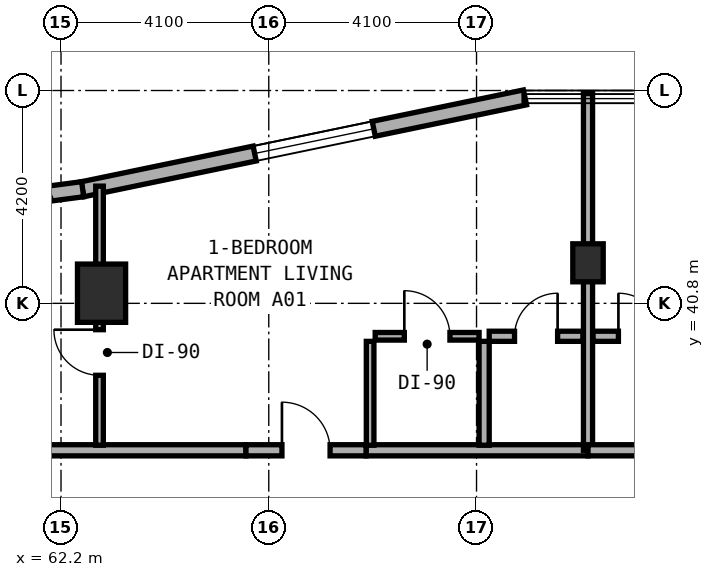
"""IFC4 building model, lengths in metres.
Left out: names, types, materials, properties, quantities, classifications, styles, units other than length and angle.
Written with IfcOpenShell. Run it as: python <this file> out.ifc"""

import sys

from ifc_helpers import new_model, si_unit, direction, frame, frame_2d, origin, origin_2d, place, context, subcontext, project, spatial, rectangle, extrude, element, fill, save


model = new_model("IFC4")
c1 = context("Model", 3, precision=1e-05, world=origin(), true_north=direction((0.0, 1.0)))
c2 = subcontext(c1, "Body", "Model", "MODEL_VIEW")
j1 = project(units=[si_unit("LENGTHUNIT", "METRE"), si_unit("PLANEANGLEUNIT", "RADIAN")], contexts=[c1])
p1 = place(None, origin())
s1 = spatial("IfcSite", under=j1, at=p1, CompositionType="ELEMENT")
p2 = place(p1, origin())
s2 = spatial("IfcBuilding", under=s1, at=p2, CompositionType="ELEMENT")
p3 = place(p2, frame((0.0, 0.0, 73.0)))
s3 = spatial("IfcBuildingStorey", under=s2, at=p3, CompositionType="ELEMENT", Elevation=73.0)
p4 = place(p3, frame((72.6, 41.6, 0.0), z_axis=(0.0, 0.0, 1.0), x_axis=(1.0, 0.0, 0.0)))
e1 = element("IfcColumn", 1, at=p4, inside=s3, PredefinedType="COLUMN", context=c2, shape_type="SweptSolid", body=[
    extrude(rectangle(XDim=0.6, YDim=0.75, at=origin_2d()), origin(), (0.0, 0.0, 1.0), 3.5),
])
p5 = place(p3, frame((63.0, 41.0, 0.0), z_axis=(0.0, 0.0, 1.0), x_axis=(1.0, 0.0, 0.0)))
e2 = element("IfcColumn", 2, at=p5, inside=s3, PredefinedType="COLUMN", context=c2, shape_type="SweptSolid", body=[
    extrude(rectangle(XDim=0.95, YDim=1.15, at=origin_2d()), origin(), (0.0, 0.0, 1.0), 3.5),
])
p6 = place(p3, frame((71.356, 44.864, 0.0), z_axis=(0.0, 0.0, 1.0), x_axis=(-0.979127260729, -0.203248142175, 0.0)))
e3 = element("IfcWall", 3, at=p6, inside=s3, PredefinedType="STANDARD", context=c2, shape_type="SweptSolid", body=[
    extrude(rectangle(XDim=8.92, YDim=0.3, at=frame_2d((4.46, 0.0))), origin(), (0.0, 0.0, 1.0), 3.25),
])
p7 = place(p6, frame((3.048, 0.0, 0.8)))
e4 = element("IfcOpeningElement", 4, at=p7, cuts=e3, PredefinedType="OPENING", context=c2, shape_type="SweptSolid", body=[
    extrude(rectangle(XDim=2.4, YDim=1.6, at=frame_2d((1.2, 0.8))), frame((0.0, 0.16, 0.0), z_axis=(0.0, -1.0, 0.0), x_axis=(1.0, 0.0, 0.0)), (0.0, 0.0, 1.0), 0.32),
])
p8 = place(p3, frame((62.627, 43.052, 0.0), z_axis=(0.0, 0.0, 1.0), x_axis=(-0.991480488834, -0.130255288807, 0.0)))
e5 = element("IfcWall", 5, at=p8, inside=s3, PredefinedType="STANDARD", context=c2, shape_type="SweptSolid", body=[
    extrude(rectangle(XDim=0.729, YDim=0.3, at=frame_2d((0.365, 0.0))), origin(), (0.0, 0.0, 1.0), 3.25),
])
p9 = place(p3, frame((58.16, 37.9, 0.0), z_axis=(0.0, 0.0, 1.0), x_axis=(1.0, 0.0, 0.0)))
e6 = element("IfcWall", 6, at=p9, inside=s3, PredefinedType="SOLIDWALL", context=c2, shape_type="SweptSolid", body=[
    extrude(rectangle(XDim=7.69, YDim=0.22, at=frame_2d((3.845, 0.0))), origin(), (0.0, 0.0, 1.0), 2.865),
])
p10 = place(p3, frame((68.22, 37.9, 0.0), z_axis=(0.0, 0.0, 1.0), x_axis=(1.0, 0.0, 0.0)))
e7 = element("IfcWall", 7, at=p10, inside=s3, PredefinedType="SOLIDWALL", context=c2, shape_type="SweptSolid", body=[
    extrude(rectangle(XDim=4.38, YDim=0.22, at=frame_2d((2.19, 0.0))), origin(), (0.0, 0.0, 1.0), 2.725),
])
p11 = place(p3, frame((65.85, 37.9, 0.0), z_axis=(0.0, 0.0, 1.0), x_axis=(1.0, 0.0, 0.0)))
e8 = element("IfcWall", 8, at=p11, inside=s3, PredefinedType="SOLIDWALL", context=c2, shape_type="SweptSolid", body=[
    extrude(rectangle(XDim=2.37, YDim=0.22, at=frame_2d((1.185, 0.0))), origin(), (0.0, 0.0, 1.0), 3.22),
])
p12 = place(p11, frame((0.71, 0.0, 0.0)))
e9 = element("IfcOpeningElement", 9, at=p12, cuts=e8, PredefinedType="OPENING", context=c2, shape_type="SweptSolid", body=[
    extrude(rectangle(XDim=0.95, YDim=2.1, at=frame_2d((0.475, 1.05))), frame((0.0, 0.12, 0.0), z_axis=(0.0, -1.0, 0.0), x_axis=(1.0, 0.0, 0.0)), (0.0, 0.0, 1.0), 0.24),
])
p13 = place(p3, frame((62.96, 38.0, 0.0), z_axis=(0.0, 0.0, 1.0), x_axis=(0.0, 1.0, 0.0)))
e10 = element("IfcWall", 10, at=p13, inside=s3, PredefinedType="PARTITIONING", context=c2, shape_type="SweptSolid", body=[
    extrude(rectangle(XDim=5.113, YDim=0.15, at=frame_2d((2.557, 0.0))), origin(), (0.0, 0.0, 1.0), 2.865),
])
p14 = place(p13, frame((1.38, 0.0, 0.0)))
e11 = element("IfcOpeningElement", 11, at=p14, cuts=e10, PredefinedType="OPENING", context=c2, shape_type="SweptSolid", body=[
    extrude(rectangle(XDim=0.9, YDim=2.1, at=frame_2d((0.45, 1.05))), frame((0.0, 0.085, 0.0), z_axis=(0.0, -1.0, 0.0), x_axis=(1.0, 0.0, 0.0)), (0.0, 0.0, 1.0), 0.17),
])
p15 = place(p3, frame((70.55, 38.0, 0.0), z_axis=(0.0, 0.0, 1.0), x_axis=(0.0, 1.0, 0.0)))
e12 = element("IfcWall", 12, at=p15, inside=s3, PredefinedType="PLUMBINGWALL", context=c2, shape_type="SweptSolid", body=[
    extrude(rectangle(XDim=2.05, YDim=0.2, at=frame_2d((1.025, 0.0))), origin(), (0.0, 0.0, 1.0), 3.22),
])
p16 = place(p3, frame((68.3, 38.0, 0.0), z_axis=(0.0, 0.0, 1.0), x_axis=(0.0, 1.0, 0.0)))
e13 = element("IfcWall", 13, at=p16, inside=s3, PredefinedType="PARTITIONING", context=c2, shape_type="SweptSolid", body=[
    extrude(rectangle(XDim=2.05, YDim=0.15, at=frame_2d((1.025, 0.0))), origin(), (0.0, 0.0, 1.0), 3.22),
])
p17 = place(p3, frame((70.65, 40.15, 0.0), z_axis=(0.0, 0.0, 1.0), x_axis=(1.0, 0.0, 0.0)))
e14 = element("IfcWall", 14, at=p17, inside=s3, PredefinedType="PLUMBINGWALL", context=c2, shape_type="SweptSolid", body=[
    extrude(rectangle(XDim=1.85, YDim=0.2, at=frame_2d((0.925, 0.0))), origin(), (0.0, 0.0, 1.0), 3.22),
])
p18 = place(p17, frame((0.5, 0.0, 0.0)))
e15 = element("IfcOpeningElement", 15, at=p18, cuts=e14, PredefinedType="OPENING", context=c2, shape_type="SweptSolid", body=[
    extrude(rectangle(XDim=0.85, YDim=2.1, at=frame_2d((0.425, 1.05))), frame((0.0, 0.11, 0.0), z_axis=(0.0, -1.0, 0.0), x_axis=(1.0, 0.0, 0.0)), (0.0, 0.0, 1.0), 0.22),
])
p19 = place(p3, frame((68.4, 40.15, 0.0), z_axis=(0.0, 0.0, 1.0), x_axis=(1.0, 0.0, 0.0)))
e16 = element("IfcWall", 16, at=p19, inside=s3, PredefinedType="PARTITIONING", context=c2, shape_type="SweptSolid", body=[
    extrude(rectangle(XDim=2.05, YDim=0.15, at=frame_2d((1.025, 0.0))), origin(), (0.0, 0.0, 1.0), 3.22),
])
p20 = place(p19, frame((0.575, 0.0, 0.0)))
e17 = element("IfcOpeningElement", 17, at=p20, cuts=e16, PredefinedType="OPENING", context=c2, shape_type="SweptSolid", body=[
    extrude(rectangle(XDim=0.9, YDim=2.1, at=frame_2d((0.45, 1.05))), frame((0.0, 0.085, 0.0), z_axis=(0.0, -1.0, 0.0), x_axis=(1.0, 0.0, 0.0)), (0.0, 0.0, 1.0), 0.17),
])
p21 = place(p3, frame((72.6, 37.9, 0.0), z_axis=(0.0, 0.0, 1.0), x_axis=(0.0, 1.0, 0.0)))
e18 = element("IfcWall", 18, at=p21, inside=s3, PredefinedType="SOLIDWALL", context=c2, shape_type="SweptSolid", body=[
    extrude(rectangle(XDim=7.04, YDim=0.18, at=frame_2d((3.52, 0.0))), origin(), (0.0, 0.0, 1.0), 2.725),
])
p22 = place(p3, frame((72.6, 37.9, 0.0), z_axis=(0.0, 0.0, 1.0), x_axis=(1.0, 0.0, 0.0)))
e19 = element("IfcWall", 19, at=p22, inside=s3, PredefinedType="SOLIDWALL", context=c2, shape_type="SweptSolid", body=[
    extrude(rectangle(XDim=4.38, YDim=0.22, at=frame_2d((2.19, 0.0))), origin(), (0.0, 0.0, 1.0), 2.725),
])
p23 = place(p3, frame((72.7, 40.15, 0.0), z_axis=(0.0, 0.0, 1.0), x_axis=(1.0, 0.0, 0.0)))
e20 = element("IfcWall", 20, at=p23, inside=s3, PredefinedType="PLUMBINGWALL", context=c2, shape_type="SweptSolid", body=[
    extrude(rectangle(XDim=1.85, YDim=0.2, at=frame_2d((0.925, 0.0))), origin(), (0.0, 0.0, 1.0), 3.22),
])
p24 = place(p23, frame((0.5, 0.0, 0.0)))
e21 = element("IfcOpeningElement", 21, at=p24, cuts=e20, PredefinedType="OPENING", context=c2, shape_type="SweptSolid", body=[
    extrude(rectangle(XDim=0.85, YDim=2.1, at=frame_2d((0.425, 1.05))), frame((0.0, 0.11, 0.0), z_axis=(0.0, -1.0, 0.0), x_axis=(1.0, 0.0, 0.0)), (0.0, 0.0, 1.0), 0.22),
])
p25 = place(p7, origin())
e22 = element("IfcWindow", 22, at=p25, inside=s3, PartitioningType="SINGLE_PANEL", PredefinedType="WINDOW", context=c2, shape_type="SweptSolid", body=[
    extrude(rectangle(XDim=2.4, YDim=1.6, at=frame_2d((1.2, 0.8))), frame((0.0, 0.03, 0.0), z_axis=(0.0, -1.0, 0.0), x_axis=(1.0, 0.0, 0.0)), (0.0, 0.0, 1.0), 0.06),
])
fill(e4, e22)
p26 = place(p12, origin())
e23 = element("IfcDoor", 23, at=p26, inside=s3, OperationType="SINGLE_SWING_LEFT", PredefinedType="DOOR", context=c2, shape_type="SweptSolid", body=[
    extrude(rectangle(XDim=0.95, YDim=2.1, at=frame_2d((0.475, 1.05))), frame((0.0, 0.025, 0.0), z_axis=(0.0, -1.0, 0.0), x_axis=(1.0, 0.0, 0.0)), (0.0, 0.0, 1.0), 0.05),
])
fill(e9, e23)
p27 = place(p14, origin())
e24 = element("IfcDoor", 24, at=p27, inside=s3, OperationType="SINGLE_SWING_RIGHT", PredefinedType="DOOR", context=c2, shape_type="SweptSolid", body=[
    extrude(rectangle(XDim=0.9, YDim=2.1, at=frame_2d((0.45, 1.05))), frame((0.0, 0.025, 0.0), z_axis=(0.0, -1.0, 0.0), x_axis=(1.0, 0.0, 0.0)), (0.0, 0.0, 1.0), 0.05),
])
fill(e11, e24)
p28 = place(p18, origin())
e25 = element("IfcDoor", 25, at=p28, inside=s3, OperationType="SINGLE_SWING_RIGHT", PredefinedType="DOOR", context=c2, shape_type="SweptSolid", body=[
    extrude(rectangle(XDim=0.85, YDim=2.1, at=frame_2d((0.425, 1.05))), frame((0.0, 0.025, 0.0), z_axis=(0.0, -1.0, 0.0), x_axis=(1.0, 0.0, 0.0)), (0.0, 0.0, 1.0), 0.05),
])
fill(e15, e25)
p29 = place(p20, origin())
e26 = element("IfcDoor", 26, at=p29, inside=s3, OperationType="SINGLE_SWING_LEFT", PredefinedType="DOOR", context=c2, shape_type="SweptSolid", body=[
    extrude(rectangle(XDim=0.9, YDim=2.1, at=frame_2d((0.45, 1.05))), frame((0.0, 0.025, 0.0), z_axis=(0.0, -1.0, 0.0), x_axis=(1.0, 0.0, 0.0)), (0.0, 0.0, 1.0), 0.05),
])
fill(e17, e26)
p30 = place(p24, origin())
e27 = element("IfcDoor", 27, at=p30, inside=s3, OperationType="SINGLE_SWING_LEFT", PredefinedType="DOOR", context=c2, shape_type="SweptSolid", body=[
    extrude(rectangle(XDim=0.85, YDim=2.1, at=frame_2d((0.425, 1.05))), frame((0.0, 0.025, 0.0), z_axis=(0.0, -1.0, 0.0), x_axis=(1.0, 0.0, 0.0)), (0.0, 0.0, 1.0), 0.05),
])
fill(e21, e27)
save(model, sys.argv[1])
